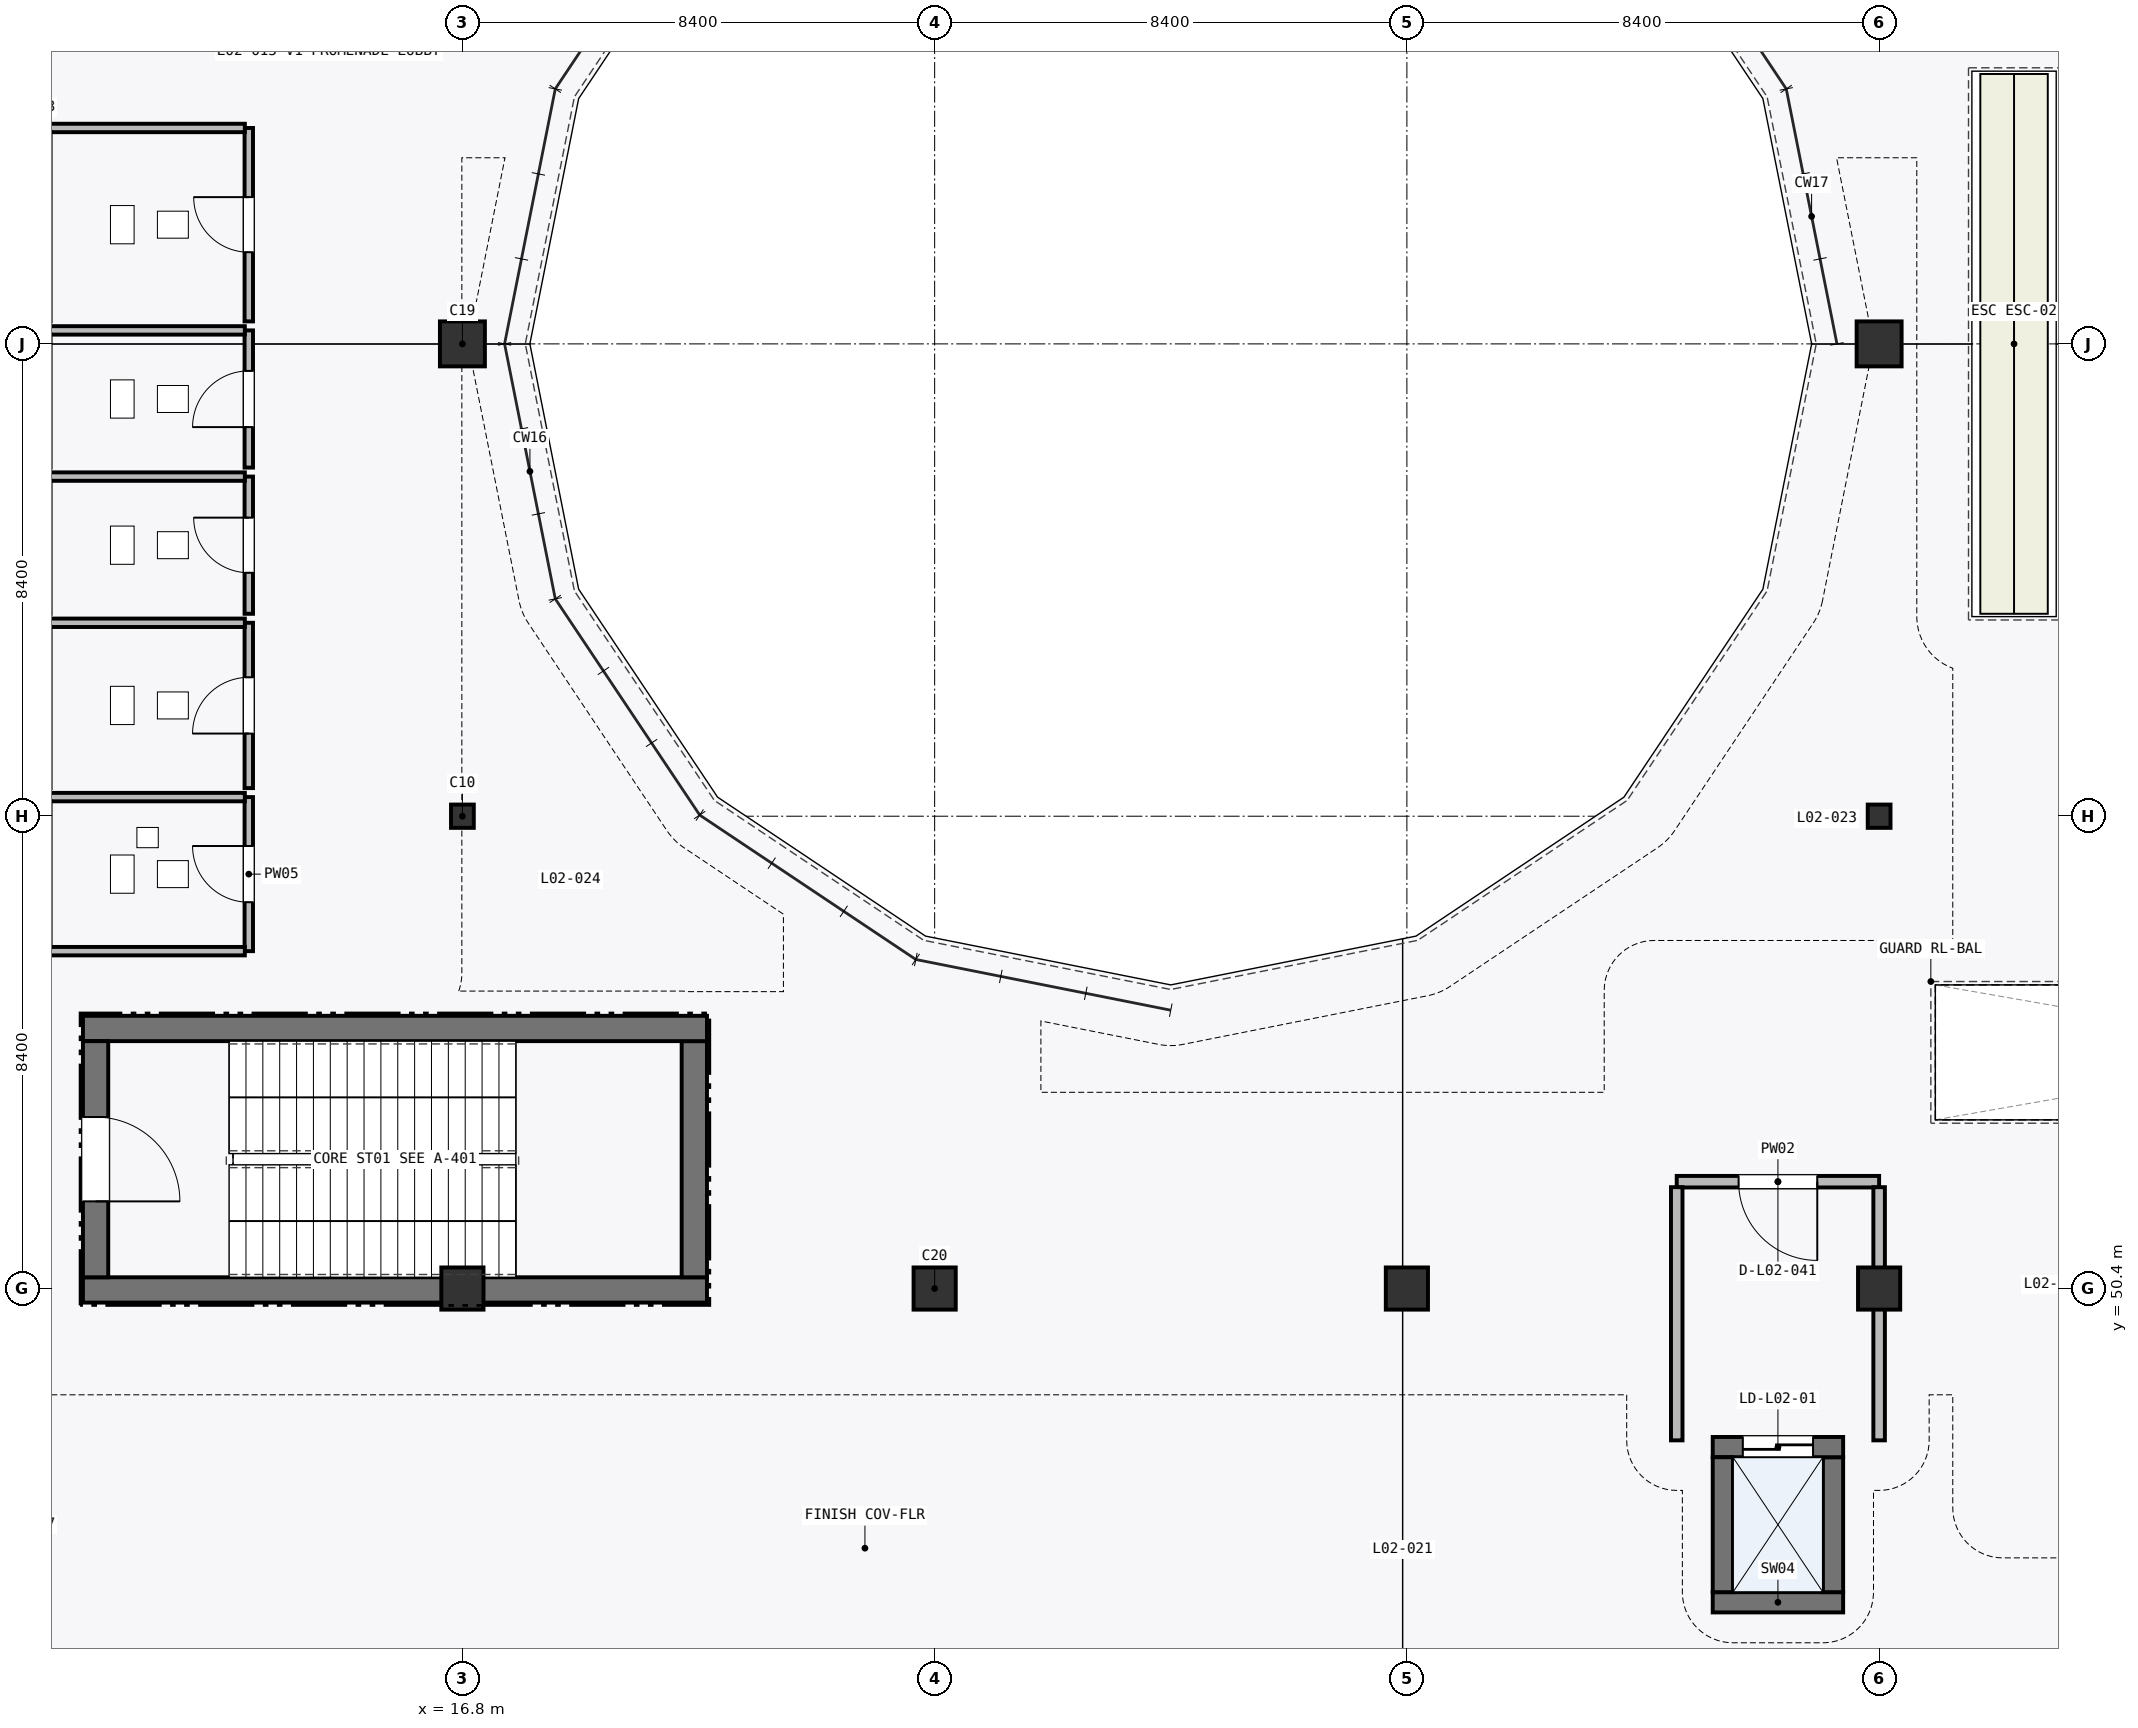
"""IFC4 building model, lengths in metres.
Left out: names, types, materials, properties, quantities, classifications, styles, units other than length and angle.
Written with IfcOpenShell. Run it as: python <this file> out.ifc"""

import sys

from ifc_helpers import new_model, si_unit, direction, frame, frame_2d, origin, origin_2d, place, context, subcontext, project, spatial, rectangle, i_section, extrude, element, fill, save


model = new_model("IFC4")
c1 = context("Model", 3, precision=1e-05, world=origin(), true_north=direction((0.0, 1.0)))
c2 = subcontext(c1, "Body", "Model", "MODEL_VIEW")
j1 = project(units=[si_unit("LENGTHUNIT", "METRE"), si_unit("PLANEANGLEUNIT", "RADIAN")], contexts=[c1])
p1 = place(None, origin())
s1 = spatial("IfcSite", under=j1, at=p1, CompositionType="ELEMENT")
p2 = place(p1, origin())
s2 = spatial("IfcBuilding", under=s1, at=p2, CompositionType="ELEMENT")
p3 = place(p2, frame((0.0, 0.0, 6.0)))
s3 = spatial("IfcBuildingStorey", under=s2, at=p3, CompositionType="ELEMENT", Elevation=6.0)
p4 = place(p3, frame((16.8, 50.4, 0.0), z_axis=(0.0, 0.0, 1.0), x_axis=(1.0, 0.0, 0.0)))
e1 = element("IfcColumn", 1, at=p4, inside=s3, PredefinedType="COLUMN", context=c2, shape_type="SweptSolid", body=[
    extrude(rectangle(XDim=0.75, YDim=0.75, at=origin_2d()), origin(), (0.0, 0.0, 1.0), 5.4),
])
p5 = place(p3, frame((16.8, 58.8, 0.0), z_axis=(0.0, 0.0, 1.0), x_axis=(1.0, 0.0, 0.0)))
e2 = element("IfcColumn", 2, at=p5, inside=s3, PredefinedType="COLUMN", context=c2, shape_type="SweptSolid", body=[
    extrude(i_section(OverallWidth=0.405, OverallDepth=0.414, WebThickness=0.018, FlangeThickness=0.028, FilletRadius=0.022, at=origin_2d()), origin(), (0.0, 0.0, 1.0), 5.4),
])
p6 = place(p3, frame((16.8, 67.2, 0.0), z_axis=(0.0, 0.0, 1.0), x_axis=(1.0, 0.0, 0.0)))
e3 = element("IfcColumn", 3, at=p6, inside=s3, PredefinedType="COLUMN", context=c2, shape_type="SweptSolid", body=[
    extrude(rectangle(XDim=0.8, YDim=0.8, at=origin_2d()), origin(), (0.0, 0.0, 1.0), 5.4),
])
for number, where, z_axis, x_axis in (
    (4, (25.2, 50.4, 0.0), (0.0, 0.0, 1.0), (1.0, 0.0, 0.0)),
    (5, (33.6, 50.4, 0.0), (0.0, 0.0, 1.0), (1.0, 0.0, 0.0)),
    (6, (42.0, 50.4, 0.0), (0.0, 0.0, 1.0), (1.0, 0.0, 0.0)),
):
    element("IfcColumn", number, at=place(p3, frame(where, z_axis=z_axis, x_axis=x_axis)), inside=s3, PredefinedType="COLUMN", context=c2, shape_type="SweptSolid", body=[
        extrude(rectangle(XDim=0.75, YDim=0.75, at=origin_2d()), origin(), (0.0, 0.0, 1.0), 5.4),
    ])
p7 = place(p3, frame((42.0, 58.8, 0.0), z_axis=(0.0, 0.0, 1.0), x_axis=(1.0, 0.0, 0.0)))
e7 = element("IfcColumn", 7, at=p7, inside=s3, PredefinedType="COLUMN", context=c2, shape_type="SweptSolid", body=[
    extrude(i_section(OverallWidth=0.405, OverallDepth=0.414, WebThickness=0.018, FlangeThickness=0.028, FilletRadius=0.022, at=origin_2d()), origin(), (0.0, 0.0, 1.0), 5.4),
])
p8 = place(p3, frame((42.0, 67.2, 0.0), z_axis=(0.0, 0.0, 1.0), x_axis=(1.0, 0.0, 0.0)))
e8 = element("IfcColumn", 8, at=p8, inside=s3, PredefinedType="COLUMN", context=c2, shape_type="SweptSolid", body=[
    extrude(rectangle(XDim=0.8, YDim=0.8, at=origin_2d()), origin(), (0.0, 0.0, 1.0), 5.4),
])
p9 = place(p3, frame((10.05, 50.375, 0.0), z_axis=(0.0, 0.0, 1.0), x_axis=(1.0, 0.0, 0.0)))
e9 = element("IfcWall", 9, at=p9, inside=s3, PredefinedType="SHEAR", context=c2, shape_type="SweptSolid", body=[
    extrude(rectangle(XDim=11.1, YDim=0.45, at=frame_2d((5.55, 0.0))), origin(), (0.0, 0.0, 1.0), 5.145),
])
p10 = place(p3, frame((20.925, 50.6, 0.0), z_axis=(0.0, 0.0, 1.0), x_axis=(0.0, 1.0, 0.0)))
e10 = element("IfcWall", 10, at=p10, inside=s3, PredefinedType="SHEAR", context=c2, shape_type="SweptSolid", body=[
    extrude(rectangle(XDim=4.2, YDim=0.45, at=frame_2d((2.1, 0.0))), origin(), (0.0, 0.0, 1.0), 5.145),
])
p11 = place(p3, frame((21.15, 55.025, 0.0), z_axis=(0.0, 0.0, 1.0), x_axis=(-1.0, 0.0, 0.0)))
e11 = element("IfcWall", 11, at=p11, inside=s3, PredefinedType="SHEAR", context=c2, shape_type="SweptSolid", body=[
    extrude(rectangle(XDim=11.1, YDim=0.45, at=frame_2d((5.55, 0.0))), origin(), (0.0, 0.0, 1.0), 5.145),
])
p12 = place(p3, frame((10.275, 54.8, 0.0), z_axis=(0.0, 0.0, 1.0), x_axis=(0.0, -1.0, 0.0)))
e12 = element("IfcWall", 12, at=p12, inside=s3, PredefinedType="SHEAR", context=c2, shape_type="SweptSolid", body=[
    extrude(rectangle(XDim=4.2, YDim=0.45, at=frame_2d((2.1, 0.0))), origin(), (0.0, 0.0, 1.0), 5.145),
])
p13 = place(p12, frame((1.35, 0.0, 0.0)))
e13 = element("IfcOpeningElement", 13, at=p13, cuts=e12, PredefinedType="OPENING", context=c2, shape_type="SweptSolid", body=[
    extrude(rectangle(XDim=1.5, YDim=2.15, at=frame_2d((0.75, 1.075))), frame((0.0, 0.235, 0.0), z_axis=(0.0, -1.0, 0.0), x_axis=(1.0, 0.0, 0.0)), (0.0, 0.0, 1.0), 0.47),
])
p14 = place(p3, frame((39.04, 44.82, 0.0), z_axis=(0.0, 0.0, 1.0), x_axis=(1.0, 0.0, 0.0)))
e14 = element("IfcWall", 14, at=p14, inside=s3, PredefinedType="SHEAR", context=c2, shape_type="SweptSolid", body=[
    extrude(rectangle(XDim=2.32, YDim=0.36, at=frame_2d((1.16, 0.0))), origin(), (0.0, 0.0, 1.0), 5.145),
])
p15 = place(p3, frame((41.18, 45.0, 0.0), z_axis=(0.0, 0.0, 1.0), x_axis=(0.0, 1.0, 0.0)))
e15 = element("IfcWall", 15, at=p15, inside=s3, PredefinedType="SHEAR", context=c2, shape_type="SweptSolid", body=[
    extrude(rectangle(XDim=2.4, YDim=0.36, at=frame_2d((1.2, 0.0))), origin(), (0.0, 0.0, 1.0), 5.145),
])
p16 = place(p3, frame((41.36, 47.58, 0.0), z_axis=(0.0, 0.0, 1.0), x_axis=(-1.0, 0.0, 0.0)))
e16 = element("IfcWall", 16, at=p16, inside=s3, PredefinedType="SHEAR", context=c2, shape_type="SweptSolid", body=[
    extrude(rectangle(XDim=2.32, YDim=0.36, at=frame_2d((1.16, 0.0))), origin(), (0.0, 0.0, 1.0), 5.145),
])
p17 = place(p16, frame((0.535, 0.0, 0.0)))
e17 = element("IfcOpeningElement", 17, at=p17, cuts=e16, PredefinedType="OPENING", context=c2, shape_type="SweptSolid", body=[
    extrude(rectangle(XDim=1.25, YDim=2.2, at=frame_2d((0.625, 1.1))), frame((0.0, 0.19, 0.0), z_axis=(0.0, -1.0, 0.0), x_axis=(1.0, 0.0, 0.0)), (0.0, 0.0, 1.0), 0.38),
])
p18 = place(p3, frame((39.22, 47.4, 0.0), z_axis=(0.0, 0.0, 1.0), x_axis=(0.0, -1.0, 0.0)))
e18 = element("IfcWall", 18, at=p18, inside=s3, PredefinedType="SHEAR", context=c2, shape_type="SweptSolid", body=[
    extrude(rectangle(XDim=2.4, YDim=0.36, at=frame_2d((1.2, 0.0))), origin(), (0.0, 0.0, 1.0), 5.145),
])
p19 = place(p3, frame((42.0, 52.3, 0.0), z_axis=(0.0, 0.0, 1.0), x_axis=(-1.0, 0.0, 0.0)))
e19 = element("IfcWall", 19, at=p19, inside=s3, PredefinedType="PARTITIONING", context=c2, shape_type="SweptSolid", body=[
    extrude(rectangle(XDim=3.6, YDim=0.205, at=frame_2d((1.8, 0.0))), origin(), (0.0, 0.0, 1.0), 5.145),
])
p20 = place(p19, frame((1.1, 0.0, 0.0)))
e20 = element("IfcOpeningElement", 20, at=p20, cuts=e19, PredefinedType="OPENING", context=c2, shape_type="SweptSolid", body=[
    extrude(rectangle(XDim=1.4, YDim=2.15, at=frame_2d((0.7, 1.075))), frame((0.0, 0.113, 0.0), z_axis=(0.0, -1.0, 0.0), x_axis=(1.0, 0.0, 0.0)), (0.0, 0.0, 1.0), 0.225),
])
p21 = place(p3, frame((42.0, 47.7, 0.0), z_axis=(0.0, 0.0, 1.0), x_axis=(0.0, 1.0, 0.0)))
e21 = element("IfcWall", 21, at=p21, inside=s3, PredefinedType="PARTITIONING", context=c2, shape_type="SweptSolid", body=[
    extrude(rectangle(XDim=4.502, YDim=0.205, at=frame_2d((2.251, 0.0))), origin(), (0.0, 0.0, 1.0), 4.429),
])
p22 = place(p3, frame((38.4, 52.202, 0.0), z_axis=(0.0, 0.0, 1.0), x_axis=(0.0, -1.0, 0.0)))
e22 = element("IfcWall", 22, at=p22, inside=s3, PredefinedType="PARTITIONING", context=c2, shape_type="SweptSolid", body=[
    extrude(rectangle(XDim=4.502, YDim=0.205, at=frame_2d((2.251, 0.0))), origin(), (0.0, 0.0, 1.0), 5.145),
])
p23 = place(p3, frame((13.0, 56.4, 0.0), z_axis=(0.0, 0.0, 1.0), x_axis=(0.0, 1.0, 0.0)))
e23 = element("IfcWall", 23, at=p23, inside=s3, PredefinedType="PARTITIONING", context=c2, shape_type="SweptSolid", body=[
    extrude(rectangle(XDim=2.74, YDim=0.15, at=frame_2d((1.37, 0.0))), origin(), (0.0, 0.0, 1.0), 5.145),
])
p24 = place(p23, frame((0.87, 0.0, 0.0)))
e24 = element("IfcOpeningElement", 24, at=p24, cuts=e23, PredefinedType="OPENING", context=c2, shape_type="SweptSolid", body=[
    extrude(rectangle(XDim=1.0, YDim=2.1, at=frame_2d((0.5, 1.05))), frame((0.0, 0.085, 0.0), z_axis=(0.0, -1.0, 0.0), x_axis=(1.0, 0.0, 0.0)), (0.0, 0.0, 1.0), 0.17),
])
p25 = place(p3, frame((9.4, 56.4, 0.0), z_axis=(0.0, 0.0, 1.0), x_axis=(1.0, 0.0, 0.0)))
e25 = element("IfcWall", 25, at=p25, inside=s3, PredefinedType="PARTITIONING", context=c2, shape_type="SweptSolid", body=[
    extrude(rectangle(XDim=3.53, YDim=0.15, at=frame_2d((1.765, 0.0))), origin(), (0.0, 0.0, 1.0), 5.145),
])
p26 = place(p3, frame((12.93, 59.14, 0.0), z_axis=(0.0, 0.0, 1.0), x_axis=(-1.0, 0.0, 0.0)))
e26 = element("IfcWall", 26, at=p26, inside=s3, PredefinedType="PARTITIONING", context=c2, shape_type="SweptSolid", body=[
    extrude(rectangle(XDim=3.53, YDim=0.15, at=frame_2d((1.765, 0.0))), origin(), (0.0, 0.0, 1.0), 4.237),
])
p27 = place(p3, frame((13.0, 59.3, 0.0), z_axis=(0.0, 0.0, 1.0), x_axis=(0.0, 1.0, 0.0)))
e27 = element("IfcWall", 27, at=p27, inside=s3, PredefinedType="PARTITIONING", context=c2, shape_type="SweptSolid", body=[
    extrude(rectangle(XDim=2.94, YDim=0.15, at=frame_2d((1.47, 0.0))), origin(), (0.0, 0.0, 1.0), 5.145),
])
p28 = place(p27, frame((0.97, 0.0, 0.0)))
e28 = element("IfcOpeningElement", 28, at=p28, cuts=e27, PredefinedType="OPENING", context=c2, shape_type="SweptSolid", body=[
    extrude(rectangle(XDim=1.0, YDim=2.1, at=frame_2d((0.5, 1.05))), frame((0.0, 0.085, 0.0), z_axis=(0.0, -1.0, 0.0), x_axis=(1.0, 0.0, 0.0)), (0.0, 0.0, 1.0), 0.17),
])
p29 = place(p3, frame((12.93, 62.24, 0.0), z_axis=(0.0, 0.0, 1.0), x_axis=(-1.0, 0.0, 0.0)))
e29 = element("IfcWall", 29, at=p29, inside=s3, PredefinedType="PARTITIONING", context=c2, shape_type="SweptSolid", body=[
    extrude(rectangle(XDim=3.53, YDim=0.15, at=frame_2d((1.765, 0.0))), origin(), (0.0, 0.0, 1.0), 5.145),
])
p30 = place(p3, frame((13.0, 62.4, 0.0), z_axis=(0.0, 0.0, 1.0), x_axis=(0.0, 1.0, 0.0)))
e30 = element("IfcWall", 30, at=p30, inside=s3, PredefinedType="PARTITIONING", context=c2, shape_type="SweptSolid", body=[
    extrude(rectangle(XDim=2.44, YDim=0.15, at=frame_2d((1.22, 0.0))), origin(), (0.0, 0.0, 1.0), 5.145),
])
p31 = place(p30, frame((0.73, 0.0, 0.0)))
e31 = element("IfcOpeningElement", 31, at=p31, cuts=e30, PredefinedType="OPENING", context=c2, shape_type="SweptSolid", body=[
    extrude(rectangle(XDim=0.98, YDim=2.1, at=frame_2d((0.49, 1.05))), frame((0.0, 0.085, 0.0), z_axis=(0.0, -1.0, 0.0), x_axis=(1.0, 0.0, 0.0)), (0.0, 0.0, 1.0), 0.17),
])
p32 = place(p3, frame((12.93, 64.84, 0.0), z_axis=(0.0, 0.0, 1.0), x_axis=(-1.0, 0.0, 0.0)))
e32 = element("IfcWall", 32, at=p32, inside=s3, PredefinedType="PARTITIONING", context=c2, shape_type="SweptSolid", body=[
    extrude(rectangle(XDim=3.53, YDim=0.15, at=frame_2d((1.765, 0.0))), origin(), (0.0, 0.0, 1.0), 5.145),
])
p33 = place(p3, frame((13.0, 65.0, 0.0), z_axis=(0.0, 0.0, 1.0), x_axis=(0.0, 1.0, 0.0)))
e33 = element("IfcWall", 33, at=p33, inside=s3, PredefinedType="PARTITIONING", context=c2, shape_type="SweptSolid", body=[
    extrude(rectangle(XDim=2.44, YDim=0.15, at=frame_2d((1.22, 0.0))), origin(), (0.0, 0.0, 1.0), 5.145),
])
p34 = place(p33, frame((0.72, 0.0, 0.0)))
e34 = element("IfcOpeningElement", 34, at=p34, cuts=e33, PredefinedType="OPENING", context=c2, shape_type="SweptSolid", body=[
    extrude(rectangle(XDim=1.0, YDim=2.1, at=frame_2d((0.5, 1.05))), frame((0.0, 0.085, 0.0), z_axis=(0.0, -1.0, 0.0), x_axis=(1.0, 0.0, 0.0)), (0.0, 0.0, 1.0), 0.17),
])
p35 = place(p3, frame((12.93, 67.44, 0.0), z_axis=(0.0, 0.0, 1.0), x_axis=(-1.0, 0.0, 0.0)))
e35 = element("IfcWall", 35, at=p35, inside=s3, PredefinedType="PARTITIONING", context=c2, shape_type="SweptSolid", body=[
    extrude(rectangle(XDim=3.53, YDim=0.15, at=frame_2d((1.765, 0.0))), origin(), (0.0, 0.0, 1.0), 4.549),
])
p36 = place(p3, frame((13.0, 67.6, 0.0), z_axis=(0.0, 0.0, 1.0), x_axis=(0.0, 1.0, 0.0)))
e36 = element("IfcWall", 36, at=p36, inside=s3, PredefinedType="PARTITIONING", context=c2, shape_type="SweptSolid", body=[
    extrude(rectangle(XDim=3.44, YDim=0.15, at=frame_2d((1.72, 0.0))), origin(), (0.0, 0.0, 1.0), 5.145),
])
p37 = place(p36, frame((1.23, 0.0, 0.0)))
e37 = element("IfcOpeningElement", 37, at=p37, cuts=e36, PredefinedType="OPENING", context=c2, shape_type="SweptSolid", body=[
    extrude(rectangle(XDim=0.98, YDim=2.1, at=frame_2d((0.49, 1.05))), frame((0.0, 0.085, 0.0), z_axis=(0.0, -1.0, 0.0), x_axis=(1.0, 0.0, 0.0)), (0.0, 0.0, 1.0), 0.17),
])
p38 = place(p3, frame((12.93, 71.04, 0.0), z_axis=(0.0, 0.0, 1.0), x_axis=(-1.0, 0.0, 0.0)))
e38 = element("IfcWall", 38, at=p38, inside=s3, PredefinedType="PARTITIONING", context=c2, shape_type="SweptSolid", body=[
    extrude(rectangle(XDim=3.53, YDim=0.15, at=frame_2d((1.765, 0.0))), origin(), (0.0, 0.0, 1.0), 5.145),
])
p39 = place(p13, origin())
e39 = element("IfcDoor", 39, at=p39, inside=s3, OperationType="SINGLE_SWING_RIGHT", PredefinedType="DOOR", context=c2, shape_type="SweptSolid", body=[
    extrude(rectangle(XDim=1.5, YDim=2.15, at=frame_2d((0.75, 1.075))), frame((0.0, 0.025, 0.0), z_axis=(0.0, -1.0, 0.0), x_axis=(1.0, 0.0, 0.0)), (0.0, 0.0, 1.0), 0.05),
])
fill(e13, e39)
p40 = place(p17, frame((1.25, 0.0, 0.0), z_axis=(0.0, 0.0, 1.0), x_axis=(-1.0, 0.0, 0.0)))
e40 = element("IfcDoor", 40, at=p40, inside=s3, OperationType="DOUBLE_DOOR_SLIDING", PredefinedType="DOOR", context=c2, shape_type="SweptSolid", body=[
    extrude(rectangle(XDim=1.25, YDim=2.2, at=frame_2d((0.625, 1.1))), frame((0.0, 0.025, 0.0), z_axis=(0.0, -1.0, 0.0), x_axis=(1.0, 0.0, 0.0)), (0.0, 0.0, 1.0), 0.05),
])
fill(e17, e40)
p41 = place(p20, origin())
e41 = element("IfcDoor", 41, at=p41, inside=s3, OperationType="SINGLE_SWING_LEFT", PredefinedType="DOOR", context=c2, shape_type="SweptSolid", body=[
    extrude(rectangle(XDim=1.4, YDim=2.15, at=frame_2d((0.7, 1.075))), frame((0.0, 0.025, 0.0), z_axis=(0.0, -1.0, 0.0), x_axis=(1.0, 0.0, 0.0)), (0.0, 0.0, 1.0), 0.05),
])
fill(e20, e41)
p42 = place(p24, origin())
e42 = element("IfcDoor", 42, at=p42, inside=s3, OperationType="SINGLE_SWING_RIGHT", PredefinedType="DOOR", context=c2, shape_type="SweptSolid", body=[
    extrude(rectangle(XDim=1.0, YDim=2.1, at=frame_2d((0.5, 1.05))), frame((0.0, 0.025, 0.0), z_axis=(0.0, -1.0, 0.0), x_axis=(1.0, 0.0, 0.0)), (0.0, 0.0, 1.0), 0.05),
])
fill(e24, e42)
p43 = place(p28, origin())
e43 = element("IfcDoor", 43, at=p43, inside=s3, OperationType="SINGLE_SWING_LEFT", PredefinedType="DOOR", context=c2, shape_type="SweptSolid", body=[
    extrude(rectangle(XDim=1.0, YDim=2.1, at=frame_2d((0.5, 1.05))), frame((0.0, 0.025, 0.0), z_axis=(0.0, -1.0, 0.0), x_axis=(1.0, 0.0, 0.0)), (0.0, 0.0, 1.0), 0.05),
])
fill(e28, e43)
p44 = place(p31, origin())
e44 = element("IfcDoor", 44, at=p44, inside=s3, OperationType="SINGLE_SWING_RIGHT", PredefinedType="DOOR", context=c2, shape_type="SweptSolid", body=[
    extrude(rectangle(XDim=0.98, YDim=2.1, at=frame_2d((0.49, 1.05))), frame((0.0, 0.025, 0.0), z_axis=(0.0, -1.0, 0.0), x_axis=(1.0, 0.0, 0.0)), (0.0, 0.0, 1.0), 0.05),
])
fill(e31, e44)
p45 = place(p34, origin())
e45 = element("IfcDoor", 45, at=p45, inside=s3, OperationType="SINGLE_SWING_LEFT", PredefinedType="DOOR", context=c2, shape_type="SweptSolid", body=[
    extrude(rectangle(XDim=1.0, YDim=2.1, at=frame_2d((0.5, 1.05))), frame((0.0, 0.025, 0.0), z_axis=(0.0, -1.0, 0.0), x_axis=(1.0, 0.0, 0.0)), (0.0, 0.0, 1.0), 0.05),
])
fill(e34, e45)
p46 = place(p37, origin())
e46 = element("IfcDoor", 46, at=p46, inside=s3, OperationType="SINGLE_SWING_RIGHT", PredefinedType="DOOR", context=c2, shape_type="SweptSolid", body=[
    extrude(rectangle(XDim=0.98, YDim=2.1, at=frame_2d((0.49, 1.05))), frame((0.0, 0.025, 0.0), z_axis=(0.0, -1.0, 0.0), x_axis=(1.0, 0.0, 0.0)), (0.0, 0.0, 1.0), 0.05),
])
fill(e37, e46)
save(model, sys.argv[1])
